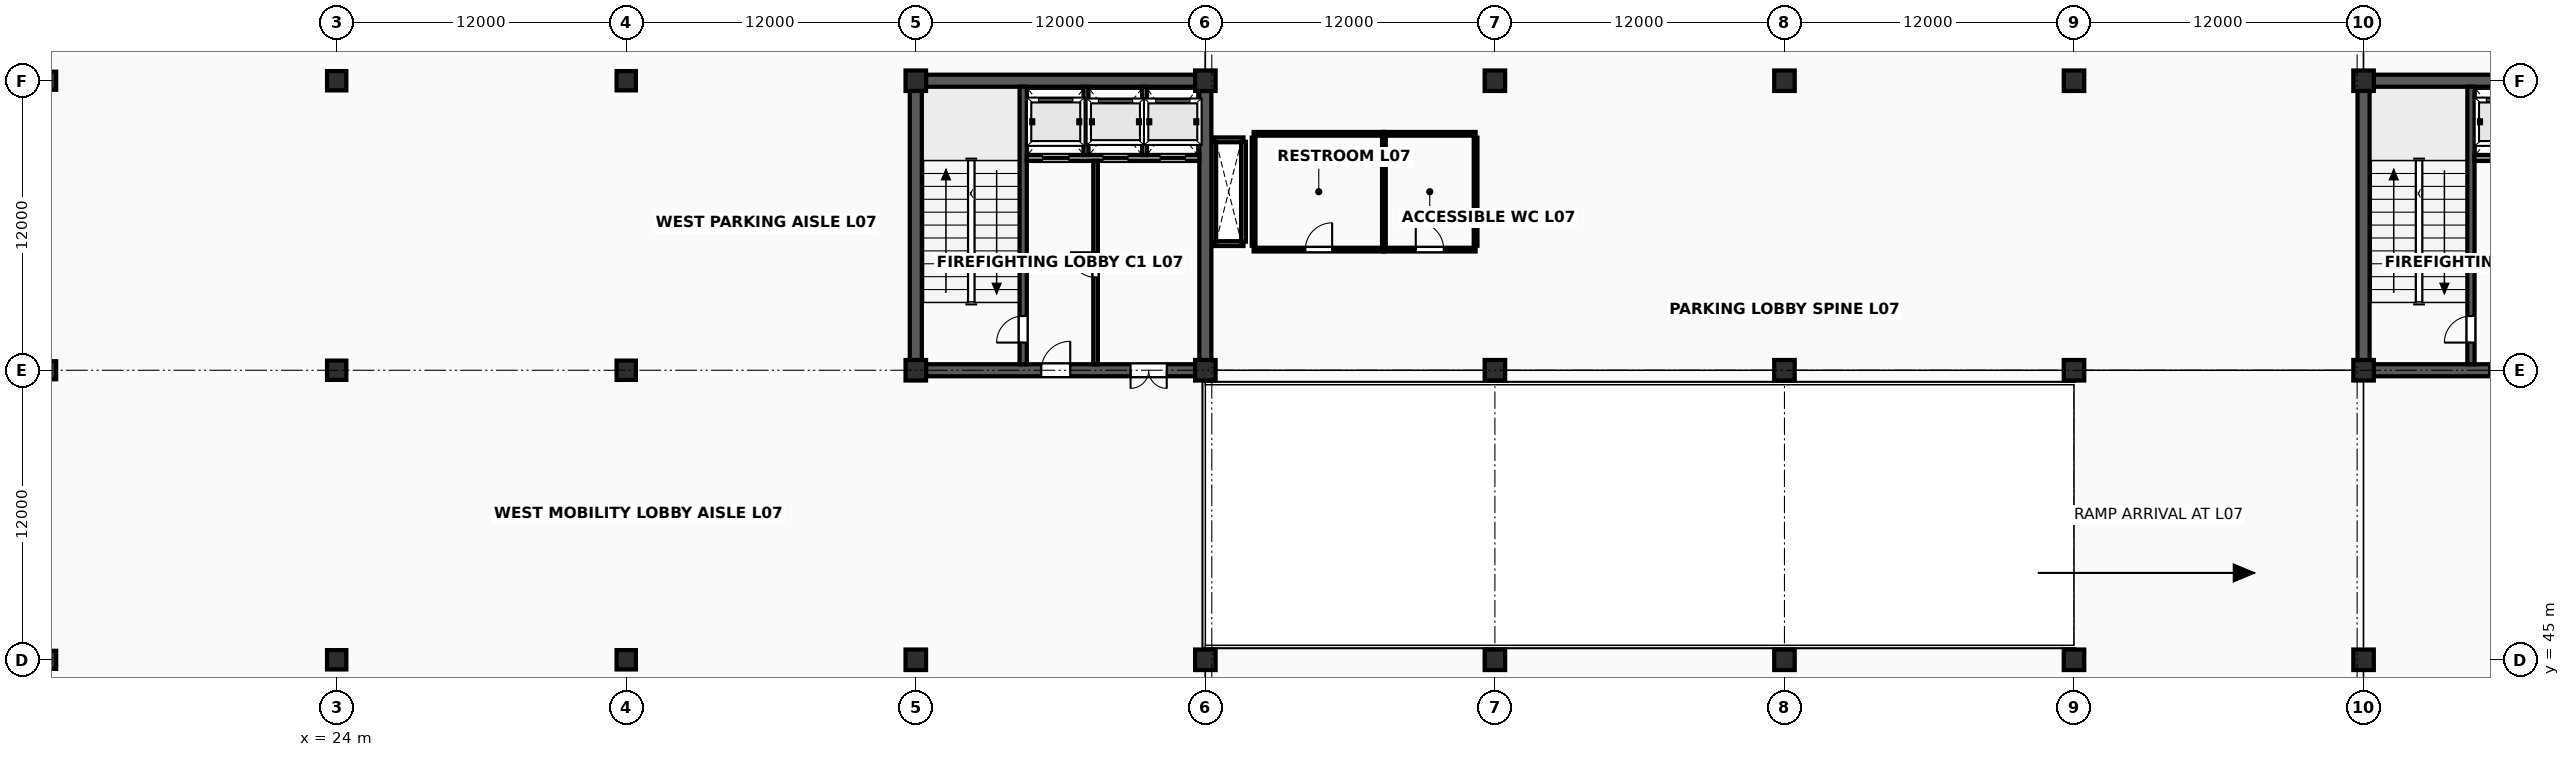
"""IFC4 building model, lengths in metres.
Left out: names, types, materials, properties, quantities, classifications, styles, units other than length and angle.
Written with IfcOpenShell. Run it as: python <this file> out.ifc"""

import sys

from ifc_helpers import new_model, si_unit, direction, frame, frame_2d, origin, origin_2d, place, context, subcontext, project, spatial, rectangle, extrude, element, fill, save


model = new_model("IFC4")
c1 = context("Model", 3, precision=1e-05, world=origin(), true_north=direction((0.0, 1.0)))
c2 = subcontext(c1, "Body", "Model", "MODEL_VIEW")
j1 = project(units=[si_unit("LENGTHUNIT", "METRE"), si_unit("PLANEANGLEUNIT", "RADIAN")], contexts=[c1])
p1 = place(None, origin())
s1 = spatial("IfcSite", under=j1, at=p1, CompositionType="ELEMENT")
p2 = place(p1, origin())
s2 = spatial("IfcBuilding", under=s1, at=p2, CompositionType="ELEMENT")
p3 = place(p2, frame((0.0, 0.0, 28.6)))
s3 = spatial("IfcBuildingStorey", under=s2, at=p3, CompositionType="ELEMENT", Elevation=28.6)
for number, where, z_axis, x_axis in (
    (1, (12.0, 45.0, 0.0), (0.0, 0.0, 1.0), (1.0, 0.0, 0.0)),
    (2, (12.0, 57.0, 0.0), (0.0, 0.0, 1.0), (1.0, 0.0, 0.0)),
    (3, (12.0, 69.0, 0.0), (0.0, 0.0, 1.0), (1.0, 0.0, 0.0)),
):
    element("IfcColumn", number, at=place(p3, frame(where, z_axis=z_axis, x_axis=x_axis)), inside=s3, PredefinedType="COLUMN", context=c2, shape_type="SweptSolid", body=[
        extrude(rectangle(XDim=0.75, YDim=0.75, at=origin_2d()), origin(), (0.0, 0.0, 1.0), 3.8),
    ])
for number, where, z_axis, x_axis in (
    (4, (24.0, 45.0, 0.0), (0.0, 0.0, 1.0), (1.0, 0.0, 0.0)),
    (5, (24.0, 57.0, 0.0), (0.0, 0.0, 1.0), (1.0, 0.0, 0.0)),
    (6, (24.0, 69.0, 0.0), (0.0, 0.0, 1.0), (1.0, 0.0, 0.0)),
    (7, (36.0, 45.0, 0.0), (0.0, 0.0, 1.0), (1.0, 0.0, 0.0)),
    (8, (36.0, 57.0, 0.0), (0.0, 0.0, 1.0), (1.0, 0.0, 0.0)),
    (9, (36.0, 69.0, 0.0), (0.0, 0.0, 1.0), (1.0, 0.0, 0.0)),
):
    element("IfcColumn", number, at=place(p3, frame(where, z_axis=z_axis, x_axis=x_axis)), inside=s3, PredefinedType="COLUMN", context=c2, shape_type="SweptSolid", body=[
        extrude(rectangle(XDim=0.8, YDim=0.8, at=origin_2d()), origin(), (0.0, 0.0, 1.0), 3.8),
    ])
for number, where, z_axis, x_axis in (
    (10, (48.0, 45.0, 0.0), (0.0, 0.0, 1.0), (1.0, 0.0, 0.0)),
    (11, (48.0, 57.0, 0.0), (0.0, 0.0, 1.0), (1.0, 0.0, 0.0)),
    (12, (48.0, 69.0, 0.0), (0.0, 0.0, 1.0), (1.0, 0.0, 0.0)),
    (13, (60.0, 45.0, 0.0), (0.0, 0.0, 1.0), (1.0, 0.0, 0.0)),
    (14, (60.0, 57.0, 0.0), (0.0, 0.0, 1.0), (1.0, 0.0, 0.0)),
    (15, (60.0, 69.0, 0.0), (0.0, 0.0, 1.0), (1.0, 0.0, 0.0)),
    (16, (72.0, 45.0, 0.0), (0.0, 0.0, 1.0), (1.0, 0.0, 0.0)),
    (17, (72.0, 57.0, 0.0), (0.0, 0.0, 1.0), (1.0, 0.0, 0.0)),
    (18, (72.0, 69.0, 0.0), (0.0, 0.0, 1.0), (1.0, 0.0, 0.0)),
    (19, (84.0, 45.0, 0.0), (0.0, 0.0, 1.0), (1.0, 0.0, 0.0)),
    (20, (84.0, 57.0, 0.0), (0.0, 0.0, 1.0), (1.0, 0.0, 0.0)),
    (21, (84.0, 69.0, 0.0), (0.0, 0.0, 1.0), (1.0, 0.0, 0.0)),
    (22, (96.0, 45.0, 0.0), (0.0, 0.0, 1.0), (1.0, 0.0, 0.0)),
    (23, (96.0, 57.0, 0.0), (0.0, 0.0, 1.0), (1.0, 0.0, 0.0)),
    (24, (96.0, 69.0, 0.0), (0.0, 0.0, 1.0), (1.0, 0.0, 0.0)),
    (25, (108.0, 45.0, 0.0), (0.0, 0.0, 1.0), (1.0, 0.0, 0.0)),
    (26, (108.0, 57.0, 0.0), (0.0, 0.0, 1.0), (1.0, 0.0, 0.0)),
    (27, (108.0, 69.0, 0.0), (0.0, 0.0, 1.0), (1.0, 0.0, 0.0)),
):
    element("IfcColumn", number, at=place(p3, frame(where, z_axis=z_axis, x_axis=x_axis)), inside=s3, PredefinedType="COLUMN", context=c2, shape_type="SweptSolid", body=[
        extrude(rectangle(XDim=0.85, YDim=0.85, at=origin_2d()), origin(), (0.0, 0.0, 1.0), 3.8),
    ])
for number, where, z_axis, x_axis in (
    (28, (60.347, 62.25, 0.0), (0.0, 0.0, 1.0), (1.0, 0.0, 0.0)),
    (29, (60.347, 66.55, 0.0), (0.0, 0.0, 1.0), (1.0, 0.0, 0.0)),
):
    element("IfcWall", number, at=place(p3, frame(where, z_axis=z_axis, x_axis=x_axis)), inside=s3, PredefinedType="SOLIDWALL", context=c2, shape_type="SweptSolid", body=[
        extrude(rectangle(XDim=1.233, YDim=0.2, at=frame_2d((0.617, 0.0))), origin(), (0.0, 0.0, 1.0), 3.553),
    ])
for number, where, z_axis, x_axis in (
    (30, (60.347, 62.33, 0.0), (0.0, 0.0, 1.0), (0.0, 1.0, 0.0)),
    (31, (61.58, 62.33, 0.0), (0.0, 0.0, 1.0), (0.0, 1.0, 0.0)),
):
    element("IfcWall", number, at=place(p3, frame(where, z_axis=z_axis, x_axis=x_axis)), inside=s3, PredefinedType="SOLIDWALL", context=c2, shape_type="SweptSolid", body=[
        extrude(rectangle(XDim=4.14, YDim=0.2, at=frame_2d((2.07, 0.0))), origin(), (0.0, 0.0, 1.0), 3.553),
    ])
p4 = place(p3, frame((48.422, 57.0, 0.0), z_axis=(0.0, 0.0, 1.0), x_axis=(1.0, 0.0, 0.0)))
e32 = element("IfcWall", 32, at=p4, inside=s3, PredefinedType="SHEAR", context=c2, shape_type="SweptSolid", body=[
    extrude(rectangle(XDim=11.156, YDim=0.5, at=frame_2d((5.578, 0.0))), origin(), (0.0, 0.0, 1.0), 3.553),
])
p5 = place(p4, frame((4.778, 0.0, 0.0)))
e33 = element("IfcOpeningElement", 33, at=p5, cuts=e32, PredefinedType="OPENING", context=c2, shape_type="SweptSolid", body=[
    extrude(rectangle(XDim=1.2, YDim=2.2, at=frame_2d((0.6, 1.1))), frame((0.0, 0.265, 0.0), z_axis=(0.0, -1.0, 0.0), x_axis=(1.0, 0.0, 0.0)), (0.0, 0.0, 1.0), 0.53),
])
p6 = place(p4, frame((8.478, 0.0, 0.0)))
e34 = element("IfcOpeningElement", 34, at=p6, cuts=e32, PredefinedType="OPENING", context=c2, shape_type="SweptSolid", body=[
    extrude(rectangle(XDim=1.5, YDim=2.25, at=frame_2d((0.75, 1.125))), frame((0.0, 0.265, 0.0), z_axis=(0.0, -1.0, 0.0), x_axis=(1.0, 0.0, 0.0)), (0.0, 0.0, 1.0), 0.53),
])
for number, where, z_axis, x_axis in (
    (35, (48.422, 69.0, 0.0), (0.0, 0.0, 1.0), (1.0, 0.0, 0.0)),
    (36, (48.0, 57.422, 0.0), (0.0, 0.0, 1.0), (0.0, 1.0, 0.0)),
    (37, (60.0, 57.422, 0.0), (0.0, 0.0, 1.0), (0.0, 1.0, 0.0)),
):
    element("IfcWall", number, at=place(p3, frame(where, z_axis=z_axis, x_axis=x_axis)), inside=s3, PredefinedType="SHEAR", context=c2, shape_type="SweptSolid", body=[
        extrude(rectangle(XDim=11.156, YDim=0.5, at=frame_2d((5.578, 0.0))), origin(), (0.0, 0.0, 1.0), 3.553),
    ])
p7 = place(p3, frame((52.45, 57.247, 0.0), z_axis=(0.0, 0.0, 1.0), x_axis=(0.0, 1.0, 0.0)))
e38 = element("IfcWall", 38, at=p7, inside=s3, PredefinedType="SHEAR", context=c2, shape_type="SweptSolid", body=[
    extrude(rectangle(XDim=11.506, YDim=0.3, at=frame_2d((5.753, 0.0))), origin(), (0.0, 0.0, 1.0), 3.553),
])
p8 = place(p7, frame((0.9, 0.0, 0.0)))
e39 = element("IfcOpeningElement", 39, at=p8, cuts=e38, PredefinedType="OPENING", context=c2, shape_type="SweptSolid", body=[
    extrude(rectangle(XDim=1.1, YDim=2.2, at=frame_2d((0.55, 1.1))), frame((0.0, 0.165, 0.0), z_axis=(0.0, -1.0, 0.0), x_axis=(1.0, 0.0, 0.0)), (0.0, 0.0, 1.0), 0.33),
])
p9 = place(p3, frame((52.597, 65.8, 0.0), z_axis=(0.0, 0.0, 1.0), x_axis=(1.0, 0.0, 0.0)))
e40 = element("IfcWall", 40, at=p9, inside=s3, PredefinedType="SOLIDWALL", context=c2, shape_type="SweptSolid", body=[
    extrude(rectangle(XDim=7.156, YDim=0.25, at=frame_2d((3.578, 0.0))), origin(), (0.0, 0.0, 1.0), 3.553),
])
p10 = place(p9, frame((0.653, 0.0, 0.0)))
e41 = element("IfcOpeningElement", 41, at=p10, cuts=e40, PredefinedType="OPENING", context=c2, shape_type="SweptSolid", body=[
    extrude(rectangle(XDim=1.1, YDim=2.24, at=frame_2d((0.55, 1.12))), frame((0.0, 0.14, 0.0), z_axis=(0.0, -1.0, 0.0), x_axis=(1.0, 0.0, 0.0)), (0.0, 0.0, 1.0), 0.28),
])
p11 = place(p9, frame((3.153, 0.0, 0.0)))
e42 = element("IfcOpeningElement", 42, at=p11, cuts=e40, PredefinedType="OPENING", context=c2, shape_type="SweptSolid", body=[
    extrude(rectangle(XDim=1.05, YDim=2.2, at=frame_2d((0.525, 1.1))), frame((0.0, 0.14, 0.0), z_axis=(0.0, -1.0, 0.0), x_axis=(1.0, 0.0, 0.0)), (0.0, 0.0, 1.0), 0.28),
])
p12 = place(p9, frame((5.528, 0.0, 0.0)))
e43 = element("IfcOpeningElement", 43, at=p12, cuts=e40, PredefinedType="OPENING", context=c2, shape_type="SweptSolid", body=[
    extrude(rectangle(XDim=1.05, YDim=2.2, at=frame_2d((0.525, 1.1))), frame((0.0, 0.14, 0.0), z_axis=(0.0, -1.0, 0.0), x_axis=(1.0, 0.0, 0.0)), (0.0, 0.0, 1.0), 0.28),
])
for number, where, z_axis, x_axis in (
    (44, (55.05, 65.92, 0.0), (0.0, 0.0, 1.0), (0.0, 1.0, 0.0)),
    (45, (57.48, 65.92, 0.0), (0.0, 0.0, 1.0), (0.0, 1.0, 0.0)),
):
    element("IfcWall", number, at=place(p3, frame(where, z_axis=z_axis, x_axis=x_axis)), inside=s3, PredefinedType="SOLIDWALL", context=c2, shape_type="SweptSolid", body=[
        extrude(rectangle(XDim=2.83, YDim=0.2, at=frame_2d((1.415, 0.0))), origin(), (0.0, 0.0, 1.0), 3.543),
    ])
p13 = place(p3, frame((55.45, 57.25, 0.0), z_axis=(0.0, 0.0, 1.0), x_axis=(0.0, 1.0, 0.0)))
e46 = element("IfcWall", 46, at=p13, inside=s3, PredefinedType="SOLIDWALL", context=c2, shape_type="SweptSolid", body=[
    extrude(rectangle(XDim=8.43, YDim=0.19, at=frame_2d((4.215, 0.0))), origin(), (0.0, 0.0, 1.0), 3.543),
])
p14 = place(p13, frame((3.6, 0.0, 0.0)))
e47 = element("IfcOpeningElement", 47, at=p14, cuts=e46, PredefinedType="OPENING", context=c2, shape_type="SweptSolid", body=[
    extrude(rectangle(XDim=1.04, YDim=2.18, at=frame_2d((0.52, 1.09))), frame((0.0, 0.11, 0.0), z_axis=(0.0, -1.0, 0.0), x_axis=(1.0, 0.0, 0.0)), (0.0, 0.0, 1.0), 0.22),
])
p15 = place(p3, frame((108.422, 57.0, 0.0), z_axis=(0.0, 0.0, 1.0), x_axis=(1.0, 0.0, 0.0)))
e48 = element("IfcWall", 48, at=p15, inside=s3, PredefinedType="SHEAR", context=c2, shape_type="SweptSolid", body=[
    extrude(rectangle(XDim=11.156, YDim=0.5, at=frame_2d((5.578, 0.0))), origin(), (0.0, 0.0, 1.0), 3.553),
])
p16 = place(p15, frame((4.778, 0.0, 0.0)))
e49 = element("IfcOpeningElement", 49, at=p16, cuts=e48, PredefinedType="OPENING", context=c2, shape_type="SweptSolid", body=[
    extrude(rectangle(XDim=1.2, YDim=2.2, at=frame_2d((0.6, 1.1))), frame((0.0, 0.265, 0.0), z_axis=(0.0, -1.0, 0.0), x_axis=(1.0, 0.0, 0.0)), (0.0, 0.0, 1.0), 0.53),
])
p17 = place(p15, frame((8.478, 0.0, 0.0)))
e50 = element("IfcOpeningElement", 50, at=p17, cuts=e48, PredefinedType="OPENING", context=c2, shape_type="SweptSolid", body=[
    extrude(rectangle(XDim=1.5, YDim=2.25, at=frame_2d((0.75, 1.125))), frame((0.0, 0.265, 0.0), z_axis=(0.0, -1.0, 0.0), x_axis=(1.0, 0.0, 0.0)), (0.0, 0.0, 1.0), 0.53),
])
for number, where, z_axis, x_axis in (
    (51, (108.422, 69.0, 0.0), (0.0, 0.0, 1.0), (1.0, 0.0, 0.0)),
    (52, (108.0, 57.422, 0.0), (0.0, 0.0, 1.0), (0.0, 1.0, 0.0)),
):
    element("IfcWall", number, at=place(p3, frame(where, z_axis=z_axis, x_axis=x_axis)), inside=s3, PredefinedType="SHEAR", context=c2, shape_type="SweptSolid", body=[
        extrude(rectangle(XDim=11.156, YDim=0.5, at=frame_2d((5.578, 0.0))), origin(), (0.0, 0.0, 1.0), 3.553),
    ])
p18 = place(p3, frame((112.45, 57.247, 0.0), z_axis=(0.0, 0.0, 1.0), x_axis=(0.0, 1.0, 0.0)))
e53 = element("IfcWall", 53, at=p18, inside=s3, PredefinedType="SHEAR", context=c2, shape_type="SweptSolid", body=[
    extrude(rectangle(XDim=11.506, YDim=0.3, at=frame_2d((5.753, 0.0))), origin(), (0.0, 0.0, 1.0), 3.553),
])
p19 = place(p18, frame((0.9, 0.0, 0.0)))
e54 = element("IfcOpeningElement", 54, at=p19, cuts=e53, PredefinedType="OPENING", context=c2, shape_type="SweptSolid", body=[
    extrude(rectangle(XDim=1.1, YDim=2.2, at=frame_2d((0.55, 1.1))), frame((0.0, 0.165, 0.0), z_axis=(0.0, -1.0, 0.0), x_axis=(1.0, 0.0, 0.0)), (0.0, 0.0, 1.0), 0.33),
])
p20 = place(p3, frame((112.597, 65.8, 0.0), z_axis=(0.0, 0.0, 1.0), x_axis=(1.0, 0.0, 0.0)))
e55 = element("IfcWall", 55, at=p20, inside=s3, PredefinedType="SOLIDWALL", context=c2, shape_type="SweptSolid", body=[
    extrude(rectangle(XDim=7.156, YDim=0.25, at=frame_2d((3.578, 0.0))), origin(), (0.0, 0.0, 1.0), 3.553),
])
p21 = place(p20, frame((0.653, 0.0, 0.0)))
e56 = element("IfcOpeningElement", 56, at=p21, cuts=e55, PredefinedType="OPENING", context=c2, shape_type="SweptSolid", body=[
    extrude(rectangle(XDim=1.1, YDim=2.24, at=frame_2d((0.55, 1.12))), frame((0.0, 0.14, 0.0), z_axis=(0.0, -1.0, 0.0), x_axis=(1.0, 0.0, 0.0)), (0.0, 0.0, 1.0), 0.28),
])
p22 = place(p20, frame((3.153, 0.0, 0.0)))
e57 = element("IfcOpeningElement", 57, at=p22, cuts=e55, PredefinedType="OPENING", context=c2, shape_type="SweptSolid", body=[
    extrude(rectangle(XDim=1.05, YDim=2.2, at=frame_2d((0.525, 1.1))), frame((0.0, 0.14, 0.0), z_axis=(0.0, -1.0, 0.0), x_axis=(1.0, 0.0, 0.0)), (0.0, 0.0, 1.0), 0.28),
])
p23 = place(p20, frame((5.528, 0.0, 0.0)))
e58 = element("IfcOpeningElement", 58, at=p23, cuts=e55, PredefinedType="OPENING", context=c2, shape_type="SweptSolid", body=[
    extrude(rectangle(XDim=1.05, YDim=2.2, at=frame_2d((0.525, 1.1))), frame((0.0, 0.14, 0.0), z_axis=(0.0, -1.0, 0.0), x_axis=(1.0, 0.0, 0.0)), (0.0, 0.0, 1.0), 0.28),
])
p24 = place(p3, frame((62.0, 62.0, 0.0), z_axis=(0.0, 0.0, 1.0), x_axis=(1.0, 0.0, 0.0)))
e59 = element("IfcWall", 59, at=p24, inside=s3, PredefinedType="PLUMBINGWALL", context=c2, shape_type="SweptSolid", body=[
    extrude(rectangle(XDim=5.4, YDim=0.155, at=frame_2d((2.7, 0.0))), origin(), (0.0, 0.0, 1.0), 2.64),
])
p25 = place(p24, frame((2.145, 0.0, 0.0)))
e60 = element("IfcOpeningElement", 60, at=p25, cuts=e59, PredefinedType="OPENING", context=c2, shape_type="SweptSolid", body=[
    extrude(rectangle(XDim=1.11, YDim=2.21, at=frame_2d((0.555, 1.105))), frame((0.0, 0.093, 0.0), z_axis=(0.0, -1.0, 0.0), x_axis=(1.0, 0.0, 0.0)), (0.0, 0.0, 1.0), 0.185),
])
p26 = place(p3, frame((62.0, 66.8, 0.0), z_axis=(0.0, 0.0, 1.0), x_axis=(1.0, 0.0, 0.0)))
e61 = element("IfcWall", 61, at=p26, inside=s3, PredefinedType="PLUMBINGWALL", context=c2, shape_type="SweptSolid", body=[
    extrude(rectangle(XDim=5.4, YDim=0.155, at=frame_2d((2.7, 0.0))), origin(), (0.0, 0.0, 1.0), 2.64),
])
for number, where, z_axis, x_axis in (
    (62, (62.0, 62.16, 0.0), (0.0, 0.0, 1.0), (0.0, 1.0, 0.0)),
    (63, (67.4, 62.16, 0.0), (0.0, 0.0, 1.0), (0.0, 1.0, 0.0)),
):
    element("IfcWall", number, at=place(p3, frame(where, z_axis=z_axis, x_axis=x_axis)), inside=s3, PredefinedType="PLUMBINGWALL", context=c2, shape_type="SweptSolid", body=[
        extrude(rectangle(XDim=4.48, YDim=0.155, at=frame_2d((2.24, 0.0))), origin(), (0.0, 0.0, 1.0), 2.64),
    ])
p27 = place(p3, frame((67.4, 62.0, 0.0), z_axis=(0.0, 0.0, 1.0), x_axis=(1.0, 0.0, 0.0)))
e64 = element("IfcWall", 64, at=p27, inside=s3, PredefinedType="PLUMBINGWALL", context=c2, shape_type="SweptSolid", body=[
    extrude(rectangle(XDim=3.8, YDim=0.155, at=frame_2d((1.9, 0.0))), origin(), (0.0, 0.0, 1.0), 2.64),
])
p28 = place(p27, frame((1.32, 0.0, 0.0)))
e65 = element("IfcOpeningElement", 65, at=p28, cuts=e64, PredefinedType="OPENING", context=c2, shape_type="SweptSolid", body=[
    extrude(rectangle(XDim=1.16, YDim=2.23, at=frame_2d((0.58, 1.115))), frame((0.0, 0.093, 0.0), z_axis=(0.0, -1.0, 0.0), x_axis=(1.0, 0.0, 0.0)), (0.0, 0.0, 1.0), 0.185),
])
p29 = place(p3, frame((67.4, 66.8, 0.0), z_axis=(0.0, 0.0, 1.0), x_axis=(1.0, 0.0, 0.0)))
e66 = element("IfcWall", 66, at=p29, inside=s3, PredefinedType="PLUMBINGWALL", context=c2, shape_type="SweptSolid", body=[
    extrude(rectangle(XDim=3.8, YDim=0.155, at=frame_2d((1.9, 0.0))), origin(), (0.0, 0.0, 1.0), 2.64),
])
p30 = place(p3, frame((71.2, 62.16, 0.0), z_axis=(0.0, 0.0, 1.0), x_axis=(0.0, 1.0, 0.0)))
e67 = element("IfcWall", 67, at=p30, inside=s3, PredefinedType="PLUMBINGWALL", context=c2, shape_type="SweptSolid", body=[
    extrude(rectangle(XDim=4.48, YDim=0.155, at=frame_2d((2.24, 0.0))), origin(), (0.0, 0.0, 1.0), 2.64),
])
p31 = place(p8, origin())
e68 = element("IfcDoor", 68, at=p31, inside=s3, OperationType="SINGLE_SWING_LEFT", PredefinedType="DOOR", context=c2, shape_type="SweptSolid", body=[
    extrude(rectangle(XDim=1.1, YDim=2.2, at=frame_2d((0.55, 1.1))), frame((0.0, 0.025, 0.0), z_axis=(0.0, -1.0, 0.0), x_axis=(1.0, 0.0, 0.0)), (0.0, 0.0, 1.0), 0.05),
])
fill(e39, e68)
p32 = place(p14, origin())
e69 = element("IfcDoor", 69, at=p32, inside=s3, OperationType="SINGLE_SWING_RIGHT", PredefinedType="DOOR", context=c2, shape_type="SweptSolid", body=[
    extrude(rectangle(XDim=1.04, YDim=2.18, at=frame_2d((0.52, 1.09))), frame((0.0, 0.025, 0.0), z_axis=(0.0, -1.0, 0.0), x_axis=(1.0, 0.0, 0.0)), (0.0, 0.0, 1.0), 0.05),
])
fill(e47, e69)
p33 = place(p5, origin())
e70 = element("IfcDoor", 70, at=p33, inside=s3, OperationType="SINGLE_SWING_RIGHT", PredefinedType="DOOR", context=c2, shape_type="SweptSolid", body=[
    extrude(rectangle(XDim=1.2, YDim=2.2, at=frame_2d((0.6, 1.1))), frame((0.0, 0.025, 0.0), z_axis=(0.0, -1.0, 0.0), x_axis=(1.0, 0.0, 0.0)), (0.0, 0.0, 1.0), 0.05),
])
fill(e33, e70)
p34 = place(p6, origin())
e71 = element("IfcDoor", 71, at=p34, inside=s3, OperationType="DOUBLE_DOOR_SINGLE_SWING", PredefinedType="DOOR", context=c2, shape_type="SweptSolid", body=[
    extrude(rectangle(XDim=1.5, YDim=2.25, at=frame_2d((0.75, 1.125))), frame((0.0, 0.025, 0.0), z_axis=(0.0, -1.0, 0.0), x_axis=(1.0, 0.0, 0.0)), (0.0, 0.0, 1.0), 0.05),
])
fill(e34, e71)
p35 = place(p10, origin())
e72 = element("IfcDoor", 72, at=p35, inside=s3, OperationType="SLIDING_TO_LEFT", PredefinedType="USERDEFINED", context=c2, shape_type="SweptSolid", body=[
    extrude(rectangle(XDim=1.1, YDim=2.24, at=frame_2d((0.55, 1.12))), frame((0.0, 0.025, 0.0), z_axis=(0.0, -1.0, 0.0), x_axis=(1.0, 0.0, 0.0)), (0.0, 0.0, 1.0), 0.05),
])
fill(e41, e72)
p36 = place(p11, origin())
e73 = element("IfcDoor", 73, at=p36, inside=s3, OperationType="SLIDING_TO_LEFT", PredefinedType="USERDEFINED", context=c2, shape_type="SweptSolid", body=[
    extrude(rectangle(XDim=1.05, YDim=2.2, at=frame_2d((0.525, 1.1))), frame((0.0, 0.025, 0.0), z_axis=(0.0, -1.0, 0.0), x_axis=(1.0, 0.0, 0.0)), (0.0, 0.0, 1.0), 0.05),
])
fill(e42, e73)
p37 = place(p12, origin())
e74 = element("IfcDoor", 74, at=p37, inside=s3, OperationType="SLIDING_TO_LEFT", PredefinedType="USERDEFINED", context=c2, shape_type="SweptSolid", body=[
    extrude(rectangle(XDim=1.05, YDim=2.2, at=frame_2d((0.525, 1.1))), frame((0.0, 0.025, 0.0), z_axis=(0.0, -1.0, 0.0), x_axis=(1.0, 0.0, 0.0)), (0.0, 0.0, 1.0), 0.05),
])
fill(e43, e74)
p38 = place(p19, origin())
e75 = element("IfcDoor", 75, at=p38, inside=s3, OperationType="SINGLE_SWING_LEFT", PredefinedType="DOOR", context=c2, shape_type="SweptSolid", body=[
    extrude(rectangle(XDim=1.1, YDim=2.2, at=frame_2d((0.55, 1.1))), frame((0.0, 0.025, 0.0), z_axis=(0.0, -1.0, 0.0), x_axis=(1.0, 0.0, 0.0)), (0.0, 0.0, 1.0), 0.05),
])
fill(e54, e75)
p39 = place(p16, origin())
e76 = element("IfcDoor", 76, at=p39, inside=s3, OperationType="SINGLE_SWING_RIGHT", PredefinedType="DOOR", context=c2, shape_type="SweptSolid", body=[
    extrude(rectangle(XDim=1.2, YDim=2.2, at=frame_2d((0.6, 1.1))), frame((0.0, 0.025, 0.0), z_axis=(0.0, -1.0, 0.0), x_axis=(1.0, 0.0, 0.0)), (0.0, 0.0, 1.0), 0.05),
])
fill(e49, e76)
p40 = place(p25, origin())
e77 = element("IfcDoor", 77, at=p40, inside=s3, OperationType="SINGLE_SWING_RIGHT", PredefinedType="DOOR", context=c2, shape_type="SweptSolid", body=[
    extrude(rectangle(XDim=1.11, YDim=2.21, at=frame_2d((0.555, 1.105))), frame((0.0, 0.025, 0.0), z_axis=(0.0, -1.0, 0.0), x_axis=(1.0, 0.0, 0.0)), (0.0, 0.0, 1.0), 0.05),
])
fill(e60, e77)
p41 = place(p28, origin())
e78 = element("IfcDoor", 78, at=p41, inside=s3, OperationType="SINGLE_SWING_LEFT", PredefinedType="DOOR", context=c2, shape_type="SweptSolid", body=[
    extrude(rectangle(XDim=1.16, YDim=2.23, at=frame_2d((0.58, 1.115))), frame((0.0, 0.025, 0.0), z_axis=(0.0, -1.0, 0.0), x_axis=(1.0, 0.0, 0.0)), (0.0, 0.0, 1.0), 0.05),
])
fill(e65, e78)
save(model, sys.argv[1])
